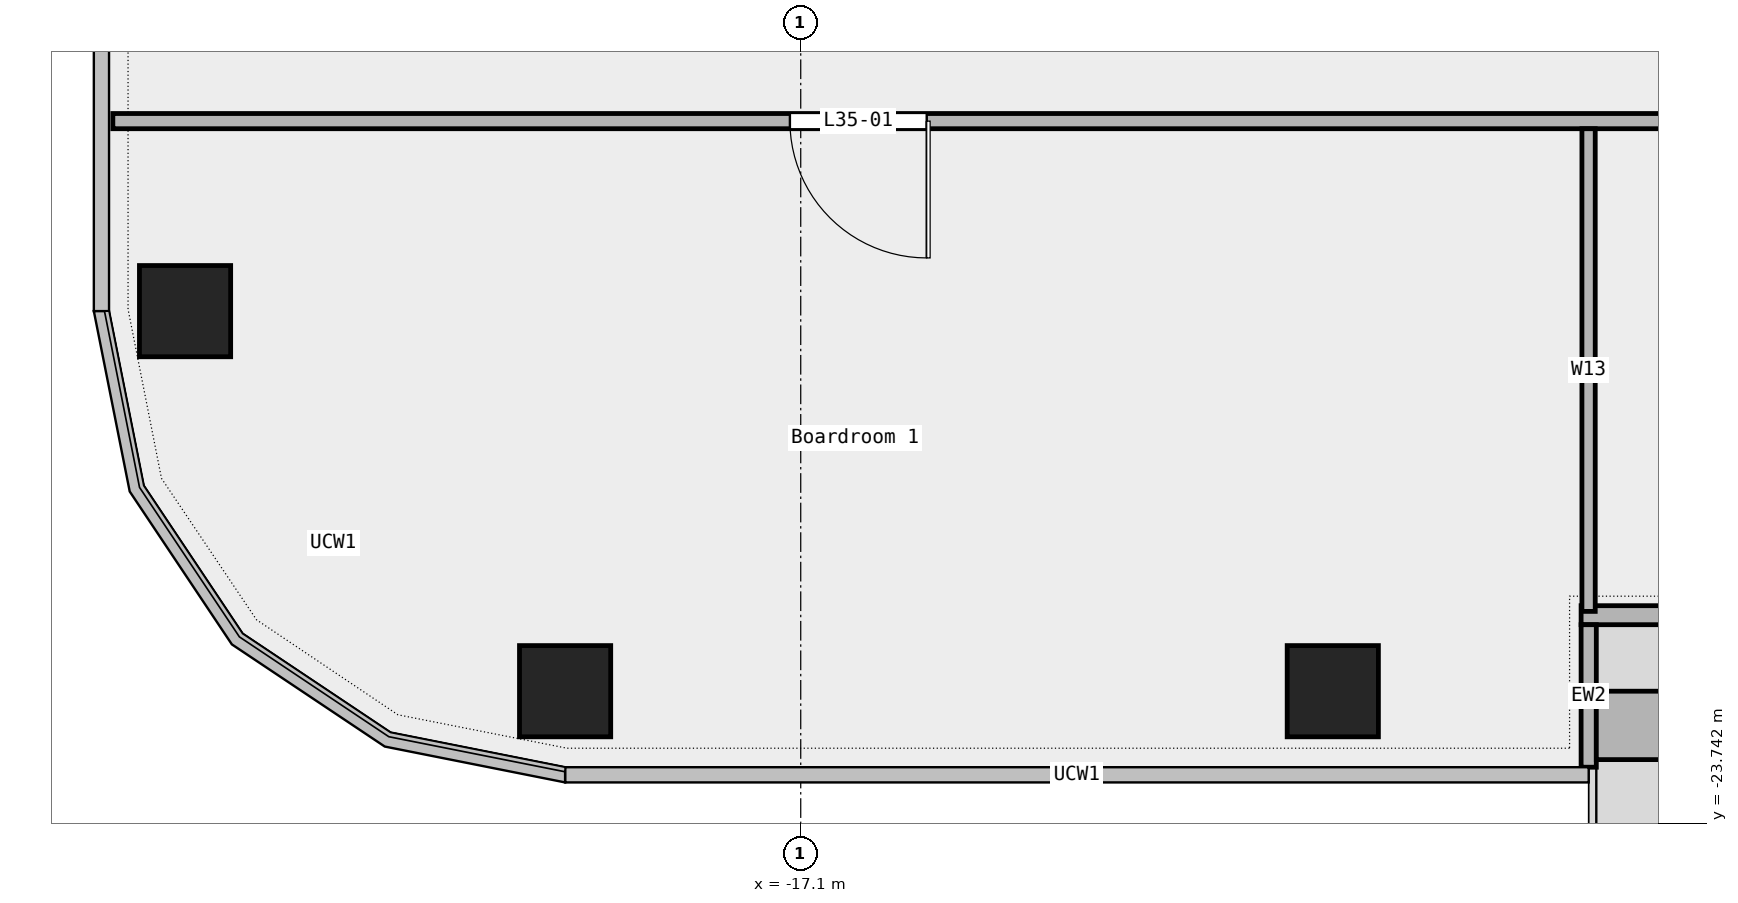
"""IFC4 building model, lengths in metres.
Left out: names, types, materials, properties, quantities, classifications, styles, units other than length and angle.
Written with IfcOpenShell. Run it as: python <this file> out.ifc"""

import sys

from ifc_helpers import new_model, si_unit, direction, frame, frame_2d, origin, origin_2d, place, context, subcontext, project, spatial, rectangle, extrude, element, fill, save


model = new_model("IFC4")
c1 = context("Model", 3, precision=1e-05, world=origin(), true_north=direction((0.0, 1.0)))
c2 = subcontext(c1, "Body", "Model", "MODEL_VIEW")
j1 = project(units=[si_unit("LENGTHUNIT", "METRE"), si_unit("PLANEANGLEUNIT", "RADIAN")], contexts=[c1])
p1 = place(None, origin())
s1 = spatial("IfcSite", under=j1, at=p1, CompositionType="ELEMENT")
p2 = place(p1, origin())
s2 = spatial("IfcBuilding", under=s1, at=p2, CompositionType="ELEMENT")
p3 = place(p2, frame((0.0, 0.0, 173.0)))
s3 = spatial("IfcBuildingStorey", under=s2, at=p3, CompositionType="ELEMENT", Elevation=173.0)
for number, where, z_axis, x_axis in (
    (1, (-20.2, -22.0, 0.0), (0.0, 0.0, 1.0), (1.0, 0.0, 0.0)),
    (2, (-10.1, -22.0, 0.0), (0.0, 0.0, 1.0), (1.0, 0.0, 0.0)),
    (3, (-25.2, -17.0, 0.0), (0.0, 0.0, 1.0), (1.0, 0.0, 0.0)),
):
    element("IfcColumn", number, at=place(p3, frame(where, z_axis=z_axis, x_axis=x_axis)), inside=s3, PredefinedType="COLUMN", context=c2, shape_type="SweptSolid", body=[
        extrude(rectangle(XDim=1.2, YDim=1.2, at=origin_2d()), origin(), (0.0, 0.0, 1.0), 3.6),
    ])
p4 = place(p3, frame((-6.833, -21.0, 0.0), z_axis=(0.0, 0.0, 1.0), x_axis=(1.0, 0.0, 0.0)))
e4 = element("IfcWall", 4, at=p4, inside=s3, PredefinedType="STANDARD", context=c2, shape_type="SweptSolid", body=[
    extrude(rectangle(XDim=13.667, YDim=0.25, at=frame_2d((6.833, 0.0))), origin(), (0.0, 0.0, 1.0), 3.6),
])
p5 = place(p4, frame((1.75, 0.0, 0.45)))
e5 = element("IfcOpeningElement", 5, at=p5, cuts=e4, PredefinedType="OPENING", context=c2, shape_type="SweptSolid", body=[
    extrude(rectangle(XDim=1.5, YDim=2.4, at=frame_2d((0.75, 1.2))), frame((0.0, 0.137, 0.0), z_axis=(0.0, -1.0, 0.0), x_axis=(1.0, 0.0, 0.0)), (0.0, 0.0, 1.0), 0.274),
])
p6 = place(p4, frame((7.75, 0.0, 0.0)))
e6 = element("IfcOpeningElement", 6, at=p6, cuts=e4, PredefinedType="OPENING", context=c2, shape_type="SweptSolid", body=[
    extrude(rectangle(XDim=1.8, YDim=2.4, at=frame_2d((0.9, 1.2))), frame((0.0, 0.137, 0.0), z_axis=(0.0, -1.0, 0.0), x_axis=(1.0, 0.0, 0.0)), (0.0, 0.0, 1.0), 0.274),
])
p7 = place(p4, frame((10.5, 0.0, 0.45)))
e7 = element("IfcOpeningElement", 7, at=p7, cuts=e4, PredefinedType="OPENING", context=c2, shape_type="SweptSolid", body=[
    extrude(rectangle(XDim=1.5, YDim=2.4, at=frame_2d((0.75, 1.2))), frame((0.0, 0.137, 0.0), z_axis=(0.0, -1.0, 0.0), x_axis=(1.0, 0.0, 0.0)), (0.0, 0.0, 1.0), 0.274),
])
p8 = place(p3, frame((-6.733, -23.0, 0.0), z_axis=(0.0, 0.0, 1.0), x_axis=(0.0, 1.0, 0.0)))
e8 = element("IfcWall", 8, at=p8, inside=s3, PredefinedType="STANDARD", context=c2, shape_type="SweptSolid", body=[
    extrude(rectangle(XDim=1.875, YDim=0.2, at=frame_2d((0.938, 0.0))), origin(), (0.0, 0.0, 1.0), 3.6),
])
p9 = place(p3, frame((-6.633, -22.45, 0.0), z_axis=(0.0, 0.0, 1.0), x_axis=(1.0, 0.0, 0.0)))
e9 = element("IfcWall", 9, at=p9, inside=s3, PredefinedType="STANDARD", context=c2, shape_type="SweptSolid", body=[
    extrude(rectangle(XDim=3.6, YDim=0.9, at=frame_2d((1.8, 0.0))), origin(), (0.0, 0.0, 1.0), 0.7),
])
p10 = place(p3, frame((-26.15, -14.5, 0.0), z_axis=(0.0, 0.0, 1.0), x_axis=(1.0, 0.0, 0.0)))
e10 = element("IfcWall", 10, at=p10, inside=s3, PredefinedType="PARTITIONING", context=c2, shape_type="SweptSolid", body=[
    extrude(rectangle(XDim=52.3, YDim=0.2, at=frame_2d((26.15, 0.0))), origin(), (0.0, 0.0, 1.0), 3.6),
])
p11 = place(p10, frame((8.907, 0.0, 0.0)))
e11 = element("IfcOpeningElement", 11, at=p11, cuts=e10, PredefinedType="OPENING", context=c2, shape_type="SweptSolid", body=[
    extrude(rectangle(XDim=1.8, YDim=2.1, at=frame_2d((0.9, 1.05))), frame((0.0, 0.112, 0.0), z_axis=(0.0, -1.0, 0.0), x_axis=(1.0, 0.0, 0.0)), (0.0, 0.0, 1.0), 0.224),
])
p12 = place(p10, frame((25.55, 0.0, 0.0)))
e12 = element("IfcOpeningElement", 12, at=p12, cuts=e10, PredefinedType="OPENING", context=c2, shape_type="SweptSolid", body=[
    extrude(rectangle(XDim=1.2, YDim=2.1, at=frame_2d((0.6, 1.05))), frame((0.0, 0.112, 0.0), z_axis=(0.0, -1.0, 0.0), x_axis=(1.0, 0.0, 0.0)), (0.0, 0.0, 1.0), 0.224),
])
p13 = place(p10, frame((41.593, 0.0, 0.0)))
e13 = element("IfcOpeningElement", 13, at=p13, cuts=e10, PredefinedType="OPENING", context=c2, shape_type="SweptSolid", body=[
    extrude(rectangle(XDim=1.8, YDim=2.1, at=frame_2d((0.9, 1.05))), frame((0.0, 0.112, 0.0), z_axis=(0.0, -1.0, 0.0), x_axis=(1.0, 0.0, 0.0)), (0.0, 0.0, 1.0), 0.224),
])
p14 = place(p3, frame((-6.735, -20.95, 0.0), z_axis=(0.0, 0.0, 1.0), x_axis=(0.0, 1.0, 0.0)))
e14 = element("IfcWall", 14, at=p14, inside=s3, PredefinedType="PARTITIONING", context=c2, shape_type="SweptSolid", body=[
    extrude(rectangle(XDim=6.35, YDim=0.175, at=frame_2d((3.175, 0.0))), origin(), (0.0, 0.0, 1.0), 3.6),
])
p15 = place(p11, origin())
e15 = element("IfcDoor", 15, at=p15, inside=s3, OperationType="DOUBLE_DOOR_SINGLE_SWING", PredefinedType="DOOR", context=c2, shape_type="SweptSolid", body=[
    extrude(rectangle(XDim=1.8, YDim=2.1, at=frame_2d((0.9, 1.05))), frame((0.0, 0.025, 0.0), z_axis=(0.0, -1.0, 0.0), x_axis=(1.0, 0.0, 0.0)), (0.0, 0.0, 1.0), 0.05),
])
fill(e11, e15)
save(model, sys.argv[1])
